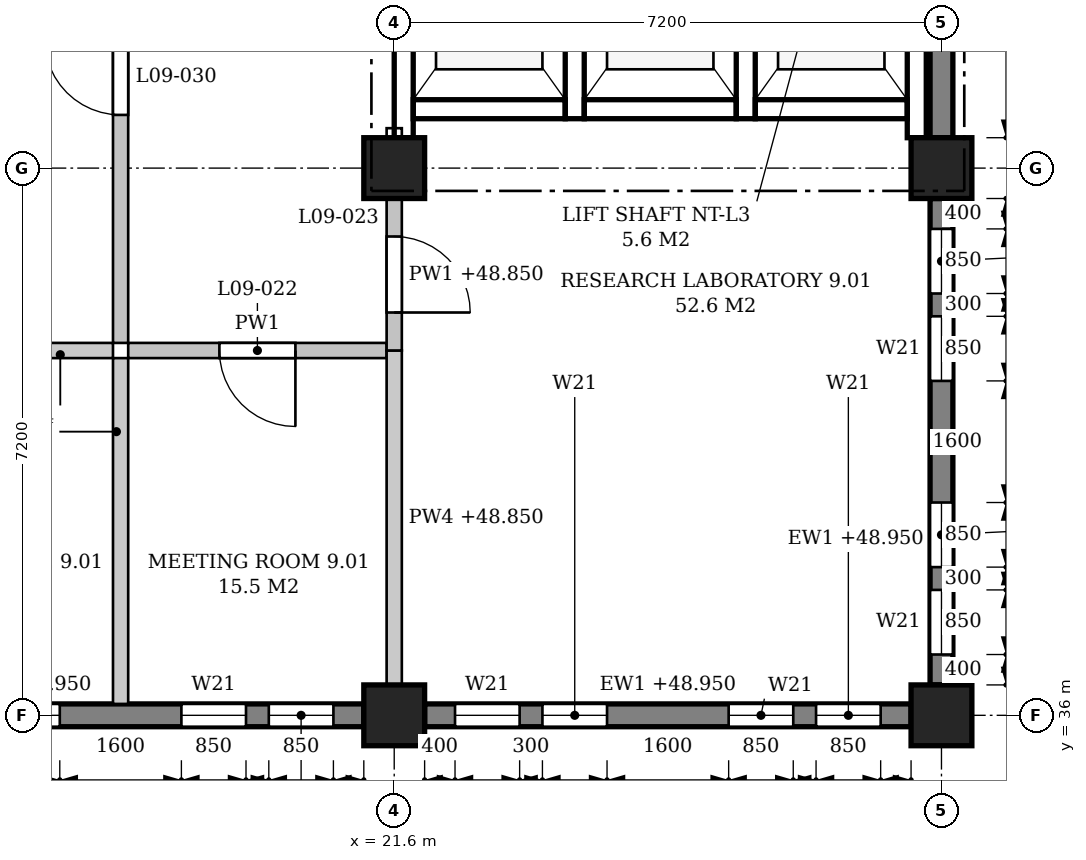
"""IFC4 building model, lengths in metres.
Left out: names, types, materials, properties, quantities, classifications, styles, units other than length and angle.
Written with IfcOpenShell. Run it as: python <this file> out.ifc"""

import sys

from ifc_helpers import new_model, si_unit, direction, frame, frame_2d, origin, origin_2d, place, context, subcontext, project, spatial, polyline, rectangle, outline, extrude, element, fill, save


model = new_model("IFC4")
c1 = context("Model", 3, precision=1e-05, world=origin(), true_north=direction((0.0, 1.0)))
c2 = subcontext(c1, "Body", "Model", "MODEL_VIEW")
j1 = project(units=[si_unit("LENGTHUNIT", "METRE"), si_unit("PLANEANGLEUNIT", "RADIAN")], contexts=[c1])
p1 = place(None, origin())
s1 = spatial("IfcSite", under=j1, at=p1, CompositionType="ELEMENT")
p2 = place(p1, origin())
s2 = spatial("IfcBuilding", under=s1, at=p2, CompositionType="ELEMENT")
p3 = place(p2, frame((0.0, 0.0, 45.3)))
s3 = spatial("IfcBuildingStorey", under=s2, at=p3, CompositionType="ELEMENT", Elevation=45.3)
for number, where, z_axis, x_axis in (
    (1, (21.6, 36.0, 0.0), (0.0, 0.0, 1.0), (1.0, 0.0, 0.0)),
    (2, (21.6, 43.2, 0.0), (0.0, 0.0, 1.0), (1.0, 0.0, 0.0)),
    (3, (28.8, 36.0, 0.0), (0.0, 0.0, 1.0), (1.0, 0.0, 0.0)),
    (4, (28.8, 43.2, 0.0), (0.0, 0.0, 1.0), (1.0, 0.0, 0.0)),
):
    element("IfcColumn", number, at=place(p3, frame(where, z_axis=z_axis, x_axis=x_axis)), inside=s3, PredefinedType="COLUMN", context=c2, shape_type="SweptSolid", body=[
        extrude(rectangle(XDim=0.8, YDim=0.8, at=origin_2d()), origin(), (0.0, 0.0, 1.0), 4.5),
    ])
p4 = place(p3, frame((28.8, 36.4, 0.0), z_axis=(0.0, 0.0, 1.0), x_axis=(0.0, 1.0, 0.0)))
e5 = element("IfcWall", 5, at=p4, inside=s3, PredefinedType="STANDARD", context=c2, shape_type="SweptSolid", body=[
    extrude(rectangle(XDim=6.4, YDim=0.3, at=frame_2d((3.2, 0.0))), origin(), (0.0, 0.0, 1.0), 3.65),
])
p5 = place(p4, frame((0.4, 0.0, 0.9)))
e6 = element("IfcOpeningElement", 6, at=p5, cuts=e5, PredefinedType="OPENING", context=c2, shape_type="SweptSolid", body=[
    extrude(outline(polyline([(0.0, 0.0), (0.85, 0.0), (0.85, 2.25), (0.425, 2.7), (0.0, 2.25), (0.0, 0.0)])), frame((0.0, 0.16, 0.0), z_axis=(0.0, -1.0, 0.0), x_axis=(1.0, 0.0, 0.0)), (0.0, 0.0, 1.0), 0.32),
])
p6 = place(p4, frame((1.55, 0.0, 0.9)))
e7 = element("IfcOpeningElement", 7, at=p6, cuts=e5, PredefinedType="OPENING", context=c2, shape_type="SweptSolid", body=[
    extrude(outline(polyline([(0.0, 0.0), (0.85, 0.0), (0.85, 2.25), (0.425, 2.7), (0.0, 2.25), (0.0, 0.0)])), frame((0.0, 0.16, 0.0), z_axis=(0.0, -1.0, 0.0), x_axis=(1.0, 0.0, 0.0)), (0.0, 0.0, 1.0), 0.32),
])
p7 = place(p4, frame((4.0, 0.0, 0.9)))
e8 = element("IfcOpeningElement", 8, at=p7, cuts=e5, PredefinedType="OPENING", context=c2, shape_type="SweptSolid", body=[
    extrude(outline(polyline([(0.0, 0.0), (0.85, 0.0), (0.85, 2.25), (0.425, 2.7), (0.0, 2.25), (0.0, 0.0)])), frame((0.0, 0.16, 0.0), z_axis=(0.0, -1.0, 0.0), x_axis=(1.0, 0.0, 0.0)), (0.0, 0.0, 1.0), 0.32),
])
p8 = place(p4, frame((5.15, 0.0, 0.9)))
e9 = element("IfcOpeningElement", 9, at=p8, cuts=e5, PredefinedType="OPENING", context=c2, shape_type="SweptSolid", body=[
    extrude(outline(polyline([(0.0, 0.0), (0.85, 0.0), (0.85, 2.25), (0.425, 2.7), (0.0, 2.25), (0.0, 0.0)])), frame((0.0, 0.16, 0.0), z_axis=(0.0, -1.0, 0.0), x_axis=(1.0, 0.0, 0.0)), (0.0, 0.0, 1.0), 0.32),
])
p9 = place(p3, frame((28.8, 43.6, 0.0), z_axis=(0.0, 0.0, 1.0), x_axis=(0.0, 1.0, 0.0)))
e10 = element("IfcWall", 10, at=p9, inside=s3, PredefinedType="STANDARD", context=c2, shape_type="SweptSolid", body=[
    extrude(rectangle(XDim=6.4, YDim=0.3, at=frame_2d((3.2, 0.0))), origin(), (0.0, 0.0, 1.0), 3.65),
])
p10 = place(p9, frame((4.0, 0.0, 0.9)))
e11 = element("IfcOpeningElement", 11, at=p10, cuts=e10, PredefinedType="OPENING", context=c2, shape_type="SweptSolid", body=[
    extrude(outline(polyline([(0.0, 0.0), (0.85, 0.0), (0.85, 2.25), (0.425, 2.7), (0.0, 2.25), (0.0, 0.0)])), frame((0.0, 0.16, 0.0), z_axis=(0.0, -1.0, 0.0), x_axis=(1.0, 0.0, 0.0)), (0.0, 0.0, 1.0), 0.32),
])
p11 = place(p9, frame((5.15, 0.0, 0.9)))
e12 = element("IfcOpeningElement", 12, at=p11, cuts=e10, PredefinedType="OPENING", context=c2, shape_type="SweptSolid", body=[
    extrude(outline(polyline([(0.0, 0.0), (0.85, 0.0), (0.85, 2.25), (0.425, 2.7), (0.0, 2.25), (0.0, 0.0)])), frame((0.0, 0.16, 0.0), z_axis=(0.0, -1.0, 0.0), x_axis=(1.0, 0.0, 0.0)), (0.0, 0.0, 1.0), 0.32),
])
p12 = place(p3, frame((14.8, 36.0, 0.0), z_axis=(0.0, 0.0, 1.0), x_axis=(1.0, 0.0, 0.0)))
e13 = element("IfcWall", 13, at=p12, inside=s3, PredefinedType="STANDARD", context=c2, shape_type="SweptSolid", body=[
    extrude(rectangle(XDim=6.4, YDim=0.3, at=frame_2d((3.2, 0.0))), origin(), (0.0, 0.0, 1.0), 3.65),
])
p13 = place(p12, frame((0.4, 0.0, 0.9)))
e14 = element("IfcOpeningElement", 14, at=p13, cuts=e13, PredefinedType="OPENING", context=c2, shape_type="SweptSolid", body=[
    extrude(outline(polyline([(0.0, 0.0), (0.85, 0.0), (0.85, 2.25), (0.425, 2.7), (0.0, 2.25), (0.0, 0.0)])), frame((0.0, 0.16, 0.0), z_axis=(0.0, -1.0, 0.0), x_axis=(1.0, 0.0, 0.0)), (0.0, 0.0, 1.0), 0.32),
])
p14 = place(p12, frame((1.55, 0.0, 0.9)))
e15 = element("IfcOpeningElement", 15, at=p14, cuts=e13, PredefinedType="OPENING", context=c2, shape_type="SweptSolid", body=[
    extrude(outline(polyline([(0.0, 0.0), (0.85, 0.0), (0.85, 2.25), (0.425, 2.7), (0.0, 2.25), (0.0, 0.0)])), frame((0.0, 0.16, 0.0), z_axis=(0.0, -1.0, 0.0), x_axis=(1.0, 0.0, 0.0)), (0.0, 0.0, 1.0), 0.32),
])
p15 = place(p12, frame((4.0, 0.0, 0.9)))
e16 = element("IfcOpeningElement", 16, at=p15, cuts=e13, PredefinedType="OPENING", context=c2, shape_type="SweptSolid", body=[
    extrude(outline(polyline([(0.0, 0.0), (0.85, 0.0), (0.85, 2.25), (0.425, 2.7), (0.0, 2.25), (0.0, 0.0)])), frame((0.0, 0.16, 0.0), z_axis=(0.0, -1.0, 0.0), x_axis=(1.0, 0.0, 0.0)), (0.0, 0.0, 1.0), 0.32),
])
p16 = place(p12, frame((5.15, 0.0, 0.9)))
e17 = element("IfcOpeningElement", 17, at=p16, cuts=e13, PredefinedType="OPENING", context=c2, shape_type="SweptSolid", body=[
    extrude(outline(polyline([(0.0, 0.0), (0.85, 0.0), (0.85, 2.25), (0.425, 2.7), (0.0, 2.25), (0.0, 0.0)])), frame((0.0, 0.16, 0.0), z_axis=(0.0, -1.0, 0.0), x_axis=(1.0, 0.0, 0.0)), (0.0, 0.0, 1.0), 0.32),
])
p17 = place(p3, frame((22.0, 36.0, 0.0), z_axis=(0.0, 0.0, 1.0), x_axis=(1.0, 0.0, 0.0)))
e18 = element("IfcWall", 18, at=p17, inside=s3, PredefinedType="STANDARD", context=c2, shape_type="SweptSolid", body=[
    extrude(rectangle(XDim=6.4, YDim=0.3, at=frame_2d((3.2, 0.0))), origin(), (0.0, 0.0, 1.0), 3.65),
])
p18 = place(p17, frame((0.4, 0.0, 0.9)))
e19 = element("IfcOpeningElement", 19, at=p18, cuts=e18, PredefinedType="OPENING", context=c2, shape_type="SweptSolid", body=[
    extrude(outline(polyline([(0.0, 0.0), (0.85, 0.0), (0.85, 2.25), (0.425, 2.7), (0.0, 2.25), (0.0, 0.0)])), frame((0.0, 0.16, 0.0), z_axis=(0.0, -1.0, 0.0), x_axis=(1.0, 0.0, 0.0)), (0.0, 0.0, 1.0), 0.32),
])
p19 = place(p17, frame((1.55, 0.0, 0.9)))
e20 = element("IfcOpeningElement", 20, at=p19, cuts=e18, PredefinedType="OPENING", context=c2, shape_type="SweptSolid", body=[
    extrude(outline(polyline([(0.0, 0.0), (0.85, 0.0), (0.85, 2.25), (0.425, 2.7), (0.0, 2.25), (0.0, 0.0)])), frame((0.0, 0.16, 0.0), z_axis=(0.0, -1.0, 0.0), x_axis=(1.0, 0.0, 0.0)), (0.0, 0.0, 1.0), 0.32),
])
p20 = place(p17, frame((4.0, 0.0, 0.9)))
e21 = element("IfcOpeningElement", 21, at=p20, cuts=e18, PredefinedType="OPENING", context=c2, shape_type="SweptSolid", body=[
    extrude(outline(polyline([(0.0, 0.0), (0.85, 0.0), (0.85, 2.25), (0.425, 2.7), (0.0, 2.25), (0.0, 0.0)])), frame((0.0, 0.16, 0.0), z_axis=(0.0, -1.0, 0.0), x_axis=(1.0, 0.0, 0.0)), (0.0, 0.0, 1.0), 0.32),
])
p21 = place(p17, frame((5.15, 0.0, 0.9)))
e22 = element("IfcOpeningElement", 22, at=p21, cuts=e18, PredefinedType="OPENING", context=c2, shape_type="SweptSolid", body=[
    extrude(outline(polyline([(0.0, 0.0), (0.85, 0.0), (0.85, 2.25), (0.425, 2.7), (0.0, 2.25), (0.0, 0.0)])), frame((0.0, 0.16, 0.0), z_axis=(0.0, -1.0, 0.0), x_axis=(1.0, 0.0, 0.0)), (0.0, 0.0, 1.0), 0.32),
])
p22 = place(p3, frame((21.725, 43.6, -0.25), z_axis=(0.0, 0.0, 1.0), x_axis=(0.0, 1.0, 0.0)))
e23 = element("IfcWall", 23, at=p22, inside=s3, PredefinedType="SHEAR", context=c2, shape_type="SweptSolid", body=[
    extrude(rectangle(XDim=3.55, YDim=0.25, at=frame_2d((1.775, 0.0))), origin(), (0.0, 0.0, 1.0), 3.8),
])
for number, where, z_axis, x_axis in (
    (24, (23.975, 43.85, -0.25), (0.0, 0.0, 1.0), (0.0, 1.0, 0.0)),
    (25, (26.225, 43.85, -0.25), (0.0, 0.0, 1.0), (0.0, 1.0, 0.0)),
):
    element("IfcWall", number, at=place(p3, frame(where, z_axis=z_axis, x_axis=x_axis)), inside=s3, PredefinedType="SHEAR", context=c2, shape_type="SweptSolid", body=[
        extrude(rectangle(XDim=3.3, YDim=0.25, at=frame_2d((1.65, 0.0))), origin(), (0.0, 0.0, 1.0), 4.5),
    ])
p23 = place(p3, frame((28.475, 43.6, -0.25), z_axis=(0.0, 0.0, 1.0), x_axis=(0.0, 1.0, 0.0)))
e26 = element("IfcWall", 26, at=p23, inside=s3, PredefinedType="SHEAR", context=c2, shape_type="SweptSolid", body=[
    extrude(rectangle(XDim=3.55, YDim=0.25, at=frame_2d((1.775, 0.0))), origin(), (0.0, 0.0, 1.0), 4.5),
])
for number, where, z_axis, x_axis in (
    (27, (21.85, 43.975, -0.25), (0.0, 0.0, 1.0), (1.0, 0.0, 0.0)),
    (28, (24.1, 43.975, -0.25), (0.0, 0.0, 1.0), (1.0, 0.0, 0.0)),
    (29, (26.35, 43.975, -0.25), (0.0, 0.0, 1.0), (1.0, 0.0, 0.0)),
):
    element("IfcWall", number, at=place(p3, frame(where, z_axis=z_axis, x_axis=x_axis)), inside=s3, PredefinedType="SHEAR", context=c2, shape_type="SweptSolid", body=[
        extrude(rectangle(XDim=2.0, YDim=0.25, at=frame_2d((1.0, 0.0))), origin(), (0.0, 0.0, 1.0), 4.5),
    ])
p24 = place(p3, frame((10.9, 40.8, 0.0), z_axis=(0.0, 0.0, 1.0), x_axis=(1.0, 0.0, 0.0)))
e30 = element("IfcWall", 30, at=p24, inside=s3, PredefinedType="PARTITIONING", context=c2, shape_type="SweptSolid", body=[
    extrude(outline(polyline([(0.0, 0.0), (7.0, 0.0), (7.0, 4.25), (3.725, 4.25), (3.725, 3.55), (3.275, 3.55), (3.275, 4.25), (0.0, 4.25), (0.0, 0.0)])), frame((0.0, 0.1, 0.0), z_axis=(0.0, -1.0, 0.0), x_axis=(1.0, 0.0, 0.0)), (0.0, 0.0, 1.0), 0.2),
])
p25 = place(p24, frame((1.25, 0.0, 0.0)))
e31 = element("IfcOpeningElement", 31, at=p25, cuts=e30, PredefinedType="OPENING", context=c2, shape_type="SweptSolid", body=[
    extrude(rectangle(XDim=1.0, YDim=2.1, at=frame_2d((0.5, 1.05))), frame((0.0, 0.11, 0.0), z_axis=(0.0, -1.0, 0.0), x_axis=(1.0, 0.0, 0.0)), (0.0, 0.0, 1.0), 0.22),
])
p26 = place(p24, frame((4.75, 0.0, 0.0)))
e32 = element("IfcOpeningElement", 32, at=p26, cuts=e30, PredefinedType="OPENING", context=c2, shape_type="SweptSolid", body=[
    extrude(rectangle(XDim=1.0, YDim=2.1, at=frame_2d((0.5, 1.05))), frame((0.0, 0.11, 0.0), z_axis=(0.0, -1.0, 0.0), x_axis=(1.0, 0.0, 0.0)), (0.0, 0.0, 1.0), 0.22),
])
p27 = place(p3, frame((18.1, 40.8, 0.0), z_axis=(0.0, 0.0, 1.0), x_axis=(1.0, 0.0, 0.0)))
e33 = element("IfcWall", 33, at=p27, inside=s3, PredefinedType="PARTITIONING", context=c2, shape_type="SweptSolid", body=[
    extrude(outline(polyline([(0.0, 0.0), (3.4, 0.0), (3.4, 3.55), (3.275, 3.55), (3.275, 4.25), (0.0, 4.25), (0.0, 0.0)])), frame((0.0, 0.1, 0.0), z_axis=(0.0, -1.0, 0.0), x_axis=(1.0, 0.0, 0.0)), (0.0, 0.0, 1.0), 0.2),
])
p28 = place(p27, frame((1.2, 0.0, 0.0)))
e34 = element("IfcOpeningElement", 34, at=p28, cuts=e33, PredefinedType="OPENING", context=c2, shape_type="SweptSolid", body=[
    extrude(rectangle(XDim=1.0, YDim=2.1, at=frame_2d((0.5, 1.05))), frame((0.0, 0.11, 0.0), z_axis=(0.0, -1.0, 0.0), x_axis=(1.0, 0.0, 0.0)), (0.0, 0.0, 1.0), 0.22),
])
p29 = place(p3, frame((18.0, 36.15, 0.0), z_axis=(0.0, 0.0, 1.0), x_axis=(0.0, 1.0, 0.0)))
e35 = element("IfcWall", 35, at=p29, inside=s3, PredefinedType="PARTITIONING", context=c2, shape_type="SweptSolid", body=[
    extrude(outline(polyline([(0.0, 0.0), (4.55, 0.0), (4.55, 4.25), (0.05, 4.25), (0.05, 3.65), (0.0, 3.65), (0.0, 0.0)])), frame((0.0, 0.1, 0.0), z_axis=(0.0, -1.0, 0.0), x_axis=(1.0, 0.0, 0.0)), (0.0, 0.0, 1.0), 0.2),
])
p30 = place(p3, frame((18.0, 40.9, 0.0), z_axis=(0.0, 0.0, 1.0), x_axis=(0.0, 1.0, 0.0)))
e36 = element("IfcWall", 36, at=p30, inside=s3, PredefinedType="PARTITIONING", context=c2, shape_type="SweptSolid", body=[
    extrude(outline(polyline([(0.0, 0.0), (7.0, 0.0), (7.0, 4.25), (2.525, 4.25), (2.525, 3.55), (2.075, 3.55), (2.075, 4.25), (0.0, 4.25), (0.0, 0.0)])), frame((0.0, 0.1, 0.0), z_axis=(0.0, -1.0, 0.0), x_axis=(1.0, 0.0, 0.0)), (0.0, 0.0, 1.0), 0.2),
])
p31 = place(p30, frame((3.0, 0.0, 0.0)))
e37 = element("IfcOpeningElement", 37, at=p31, cuts=e36, PredefinedType="OPENING", context=c2, shape_type="SweptSolid", body=[
    extrude(rectangle(XDim=1.0, YDim=2.1, at=frame_2d((0.5, 1.05))), frame((0.0, 0.11, 0.0), z_axis=(0.0, -1.0, 0.0), x_axis=(1.0, 0.0, 0.0)), (0.0, 0.0, 1.0), 0.22),
])
p32 = place(p3, frame((21.6, 36.4, 0.0), z_axis=(0.0, 0.0, 1.0), x_axis=(0.0, 1.0, 0.0)))
e38 = element("IfcWall", 38, at=p32, inside=s3, PredefinedType="PARTITIONING", context=c2, shape_type="SweptSolid", body=[
    extrude(rectangle(XDim=4.4, YDim=0.2, at=frame_2d((2.2, 0.0))), origin(), (0.0, 0.0, 1.0), 3.55),
])
p33 = place(p3, frame((21.6, 40.8, 0.0), z_axis=(0.0, 0.0, 1.0), x_axis=(0.0, 1.0, 0.0)))
e39 = element("IfcWall", 39, at=p33, inside=s3, PredefinedType="PARTITIONING", context=c2, shape_type="SweptSolid", body=[
    extrude(rectangle(XDim=2.0, YDim=0.2, at=frame_2d((1.0, 0.0))), origin(), (0.0, 0.0, 1.0), 3.55),
])
p34 = place(p33, frame((0.5, 0.0, 0.0)))
e40 = element("IfcOpeningElement", 40, at=p34, cuts=e39, PredefinedType="OPENING", context=c2, shape_type="SweptSolid", body=[
    extrude(rectangle(XDim=1.0, YDim=2.1, at=frame_2d((0.5, 1.05))), frame((0.0, 0.11, 0.0), z_axis=(0.0, -1.0, 0.0), x_axis=(1.0, 0.0, 0.0)), (0.0, 0.0, 1.0), 0.22),
])
p35 = place(p3, frame((21.6, 43.6, 0.0), z_axis=(0.0, 0.0, 1.0), x_axis=(0.0, 1.0, 0.0)))
e41 = element("IfcWall", 41, at=p35, inside=s3, PredefinedType="PARTITIONING", context=c2, shape_type="SweptSolid", body=[
    extrude(rectangle(XDim=0.125, YDim=0.2, at=frame_2d((0.062, 0.0))), origin(), (0.0, 0.0, 1.0), 3.55),
])
p36 = place(p5, origin())
e42 = element("IfcWindow", 42, at=p36, inside=s3, PartitioningType="SINGLE_PANEL", PredefinedType="WINDOW", context=c2, shape_type="SweptSolid", body=[
    extrude(outline(polyline([(0.0, 0.0), (0.85, 0.0), (0.85, 2.25), (0.425, 2.7), (0.0, 2.25), (0.0, 0.0)])), frame((0.0, 0.03, 0.0), z_axis=(0.0, -1.0, 0.0), x_axis=(1.0, 0.0, 0.0)), (0.0, 0.0, 1.0), 0.06),
])
fill(e6, e42)
p37 = place(p6, origin())
e43 = element("IfcWindow", 43, at=p37, inside=s3, PartitioningType="SINGLE_PANEL", PredefinedType="WINDOW", context=c2, shape_type="SweptSolid", body=[
    extrude(outline(polyline([(0.0, 0.0), (0.85, 0.0), (0.85, 2.25), (0.425, 2.7), (0.0, 2.25), (0.0, 0.0)])), frame((0.0, 0.03, 0.0), z_axis=(0.0, -1.0, 0.0), x_axis=(1.0, 0.0, 0.0)), (0.0, 0.0, 1.0), 0.06),
])
fill(e7, e43)
p38 = place(p7, origin())
e44 = element("IfcWindow", 44, at=p38, inside=s3, PartitioningType="SINGLE_PANEL", PredefinedType="WINDOW", context=c2, shape_type="SweptSolid", body=[
    extrude(outline(polyline([(0.0, 0.0), (0.85, 0.0), (0.85, 2.25), (0.425, 2.7), (0.0, 2.25), (0.0, 0.0)])), frame((0.0, 0.03, 0.0), z_axis=(0.0, -1.0, 0.0), x_axis=(1.0, 0.0, 0.0)), (0.0, 0.0, 1.0), 0.06),
])
fill(e8, e44)
p39 = place(p8, origin())
e45 = element("IfcWindow", 45, at=p39, inside=s3, PartitioningType="SINGLE_PANEL", PredefinedType="WINDOW", context=c2, shape_type="SweptSolid", body=[
    extrude(outline(polyline([(0.0, 0.0), (0.85, 0.0), (0.85, 2.25), (0.425, 2.7), (0.0, 2.25), (0.0, 0.0)])), frame((0.0, 0.03, 0.0), z_axis=(0.0, -1.0, 0.0), x_axis=(1.0, 0.0, 0.0)), (0.0, 0.0, 1.0), 0.06),
])
fill(e9, e45)
p40 = place(p14, origin())
e46 = element("IfcWindow", 46, at=p40, inside=s3, PartitioningType="SINGLE_PANEL", PredefinedType="WINDOW", context=c2, shape_type="SweptSolid", body=[
    extrude(outline(polyline([(0.0, 0.0), (0.85, 0.0), (0.85, 2.25), (0.425, 2.7), (0.0, 2.25), (0.0, 0.0)])), frame((0.0, 0.03, 0.0), z_axis=(0.0, -1.0, 0.0), x_axis=(1.0, 0.0, 0.0)), (0.0, 0.0, 1.0), 0.06),
])
fill(e15, e46)
p41 = place(p15, origin())
e47 = element("IfcWindow", 47, at=p41, inside=s3, PartitioningType="SINGLE_PANEL", PredefinedType="WINDOW", context=c2, shape_type="SweptSolid", body=[
    extrude(outline(polyline([(0.0, 0.0), (0.85, 0.0), (0.85, 2.25), (0.425, 2.7), (0.0, 2.25), (0.0, 0.0)])), frame((0.0, 0.03, 0.0), z_axis=(0.0, -1.0, 0.0), x_axis=(1.0, 0.0, 0.0)), (0.0, 0.0, 1.0), 0.06),
])
fill(e16, e47)
p42 = place(p16, origin())
e48 = element("IfcWindow", 48, at=p42, inside=s3, PartitioningType="SINGLE_PANEL", PredefinedType="WINDOW", context=c2, shape_type="SweptSolid", body=[
    extrude(outline(polyline([(0.0, 0.0), (0.85, 0.0), (0.85, 2.25), (0.425, 2.7), (0.0, 2.25), (0.0, 0.0)])), frame((0.0, 0.03, 0.0), z_axis=(0.0, -1.0, 0.0), x_axis=(1.0, 0.0, 0.0)), (0.0, 0.0, 1.0), 0.06),
])
fill(e17, e48)
p43 = place(p18, origin())
e49 = element("IfcWindow", 49, at=p43, inside=s3, PartitioningType="SINGLE_PANEL", PredefinedType="WINDOW", context=c2, shape_type="SweptSolid", body=[
    extrude(outline(polyline([(0.0, 0.0), (0.85, 0.0), (0.85, 2.25), (0.425, 2.7), (0.0, 2.25), (0.0, 0.0)])), frame((0.0, 0.03, 0.0), z_axis=(0.0, -1.0, 0.0), x_axis=(1.0, 0.0, 0.0)), (0.0, 0.0, 1.0), 0.06),
])
fill(e19, e49)
p44 = place(p19, origin())
e50 = element("IfcWindow", 50, at=p44, inside=s3, PartitioningType="SINGLE_PANEL", PredefinedType="WINDOW", context=c2, shape_type="SweptSolid", body=[
    extrude(outline(polyline([(0.0, 0.0), (0.85, 0.0), (0.85, 2.25), (0.425, 2.7), (0.0, 2.25), (0.0, 0.0)])), frame((0.0, 0.03, 0.0), z_axis=(0.0, -1.0, 0.0), x_axis=(1.0, 0.0, 0.0)), (0.0, 0.0, 1.0), 0.06),
])
fill(e20, e50)
p45 = place(p20, origin())
e51 = element("IfcWindow", 51, at=p45, inside=s3, PartitioningType="SINGLE_PANEL", PredefinedType="WINDOW", context=c2, shape_type="SweptSolid", body=[
    extrude(outline(polyline([(0.0, 0.0), (0.85, 0.0), (0.85, 2.25), (0.425, 2.7), (0.0, 2.25), (0.0, 0.0)])), frame((0.0, 0.03, 0.0), z_axis=(0.0, -1.0, 0.0), x_axis=(1.0, 0.0, 0.0)), (0.0, 0.0, 1.0), 0.06),
])
fill(e21, e51)
p46 = place(p21, origin())
e52 = element("IfcWindow", 52, at=p46, inside=s3, PartitioningType="SINGLE_PANEL", PredefinedType="WINDOW", context=c2, shape_type="SweptSolid", body=[
    extrude(outline(polyline([(0.0, 0.0), (0.85, 0.0), (0.85, 2.25), (0.425, 2.7), (0.0, 2.25), (0.0, 0.0)])), frame((0.0, 0.03, 0.0), z_axis=(0.0, -1.0, 0.0), x_axis=(1.0, 0.0, 0.0)), (0.0, 0.0, 1.0), 0.06),
])
fill(e22, e52)
p47 = place(p28, frame((1.0, 0.0, 0.0), z_axis=(0.0, 0.0, 1.0), x_axis=(-1.0, 0.0, 0.0)))
e53 = element("IfcDoor", 53, at=p47, inside=s3, OperationType="SINGLE_SWING_LEFT", PredefinedType="DOOR", context=c2, shape_type="SweptSolid", body=[
    extrude(rectangle(XDim=1.0, YDim=2.1, at=frame_2d((0.5, 1.05))), frame((0.0, 0.025, 0.0), z_axis=(0.0, -1.0, 0.0), x_axis=(1.0, 0.0, 0.0)), (0.0, 0.0, 1.0), 0.05),
])
fill(e34, e53)
p48 = place(p34, frame((1.0, 0.0, 0.0), z_axis=(0.0, 0.0, 1.0), x_axis=(-1.0, 0.0, 0.0)))
e54 = element("IfcDoor", 54, at=p48, inside=s3, OperationType="SINGLE_SWING_RIGHT", PredefinedType="DOOR", context=c2, shape_type="SweptSolid", body=[
    extrude(rectangle(XDim=1.0, YDim=2.1, at=frame_2d((0.5, 1.05))), frame((0.0, 0.025, 0.0), z_axis=(0.0, -1.0, 0.0), x_axis=(1.0, 0.0, 0.0)), (0.0, 0.0, 1.0), 0.05),
])
fill(e40, e54)
p49 = place(p31, origin())
e55 = element("IfcDoor", 55, at=p49, inside=s3, OperationType="SINGLE_SWING_RIGHT", PredefinedType="DOOR", context=c2, shape_type="SweptSolid", body=[
    extrude(rectangle(XDim=1.0, YDim=2.1, at=frame_2d((0.5, 1.05))), frame((0.0, 0.025, 0.0), z_axis=(0.0, -1.0, 0.0), x_axis=(1.0, 0.0, 0.0)), (0.0, 0.0, 1.0), 0.05),
])
fill(e37, e55)
save(model, sys.argv[1])
